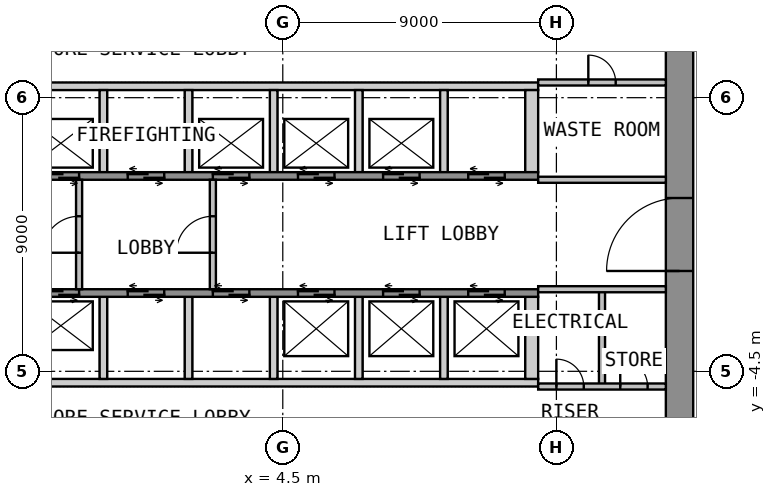
"""IFC4 building model, lengths in metres.
Left out: names, types, materials, properties, quantities, classifications, styles, units other than length and angle.
Written with IfcOpenShell. Run it as: python <this file> out.ifc"""

import sys

from ifc_helpers import new_model, si_unit, direction, frame, frame_2d, origin, place, context, subcontext, project, spatial, polyline, rectangle, outline, extrude, element, fill, save


model = new_model("IFC4")
c1 = context("Model", 3, precision=1e-05, world=origin(), true_north=direction((0.0, 1.0)))
c2 = subcontext(c1, "Body", "Model", "MODEL_VIEW")
j1 = project(units=[si_unit("LENGTHUNIT", "METRE"), si_unit("PLANEANGLEUNIT", "RADIAN")], contexts=[c1])
p1 = place(None, origin())
s1 = spatial("IfcSite", under=j1, at=p1, CompositionType="ELEMENT")
p2 = place(p1, origin())
s2 = spatial("IfcBuilding", under=s1, at=p2, CompositionType="ELEMENT")
p3 = place(p2, origin())
s3 = spatial("IfcBuildingStorey", under=s2, at=p3, CompositionType="ELEMENT", Elevation=0.0)
p4 = place(p3, frame((17.55, -12.6, 0.0), z_axis=(0.0, 0.0, 1.0), x_axis=(0.0, 1.0, 0.0)))
e1 = element("IfcWall", 1, at=p4, inside=s3, PredefinedType="SHEAR", context=c2, shape_type="SweptSolid", body=[
    extrude(rectangle(XDim=25.2, YDim=0.9, at=frame_2d((12.6, 0.0))), origin(), (0.0, 0.0, 1.0), 5.6),
])
p5 = place(p4, frame((11.4, 0.0, 0.0)))
e2 = element("IfcOpeningElement", 2, at=p5, cuts=e1, PredefinedType="OPENING", context=c2, shape_type="SweptSolid", body=[
    extrude(rectangle(XDim=2.4, YDim=2.1, at=frame_2d((1.2, 1.05))), frame((0.0, 0.46, 0.0), z_axis=(0.0, -1.0, 0.0), x_axis=(1.0, 0.0, 0.0)), (0.0, 0.0, 1.0), 0.92),
])
p6 = place(p3, origin())
e3 = element("IfcWall", 3, at=p6, inside=s3, PredefinedType="SHEAR", context=c2, shape_type="SweptSolid", body=[
    extrude(outline(polyline([(-12.9, 4.75), (12.9, 4.75), (12.9, 5.0), (-12.9, 5.0), (-12.9, 4.75)])), origin(), (0.0, 0.0, 1.0), 5.6),
])
p7 = place(p3, origin())
e4 = element("IfcWall", 4, at=p7, inside=s3, PredefinedType="SHEAR", context=c2, shape_type="SweptSolid", body=[
    extrude(outline(polyline([(-1.525, 2.05), (-1.275, 2.05), (-1.275, 4.75), (-1.525, 4.75), (-1.525, 2.05)])), origin(), (0.0, 0.0, 1.0), 5.6),
])
p8 = place(p3, origin())
e5 = element("IfcWall", 5, at=p8, inside=s3, PredefinedType="SHEAR", context=c2, shape_type="SweptSolid", body=[
    extrude(outline(polyline([(1.275, 2.05), (1.525, 2.05), (1.525, 4.75), (1.275, 4.75), (1.275, 2.05)])), origin(), (0.0, 0.0, 1.0), 5.6),
])
p9 = place(p3, origin())
e6 = element("IfcWall", 6, at=p9, inside=s3, PredefinedType="SHEAR", context=c2, shape_type="SweptSolid", body=[
    extrude(outline(polyline([(4.075, 2.05), (4.325, 2.05), (4.325, 4.75), (4.075, 4.75), (4.075, 2.05)])), origin(), (0.0, 0.0, 1.0), 5.6),
])
p10 = place(p3, origin())
e7 = element("IfcWall", 7, at=p10, inside=s3, PredefinedType="SHEAR", context=c2, shape_type="SweptSolid", body=[
    extrude(outline(polyline([(6.875, 2.05), (7.125, 2.05), (7.125, 4.75), (6.875, 4.75), (6.875, 2.05)])), origin(), (0.0, 0.0, 1.0), 5.6),
])
p11 = place(p3, origin())
e8 = element("IfcWall", 8, at=p11, inside=s3, PredefinedType="SHEAR", context=c2, shape_type="SweptSolid", body=[
    extrude(outline(polyline([(9.675, 2.05), (9.925, 2.05), (9.925, 4.75), (9.675, 4.75), (9.675, 2.05)])), origin(), (0.0, 0.0, 1.0), 5.6),
])
p12 = place(p3, origin())
e9 = element("IfcWall", 9, at=p12, inside=s3, PredefinedType="SHEAR", context=c2, shape_type="SweptSolid", body=[
    extrude(outline(polyline([(12.475, 2.05), (12.9, 2.05), (12.9, 4.75), (12.475, 4.75), (12.475, 2.05)])), origin(), (0.0, 0.0, 1.0), 5.6),
])
p13 = place(p3, frame((-12.9, 1.925, 0.0), z_axis=(0.0, 0.0, 1.0), x_axis=(1.0, 0.0, 0.0)))
e10 = element("IfcWall", 10, at=p13, inside=s3, PredefinedType="SHEAR", context=c2, shape_type="SweptSolid", body=[
    extrude(rectangle(XDim=25.8, YDim=0.25, at=frame_2d((12.9, 0.0))), origin(), (0.0, 0.0, 1.0), 5.6),
])
p14 = place(p13, frame((1.1, 0.0, 0.0)))
e11 = element("IfcOpeningElement", 11, at=p14, cuts=e10, PredefinedType="OPENING", context=c2, shape_type="SweptSolid", body=[
    extrude(rectangle(XDim=1.2, YDim=2.1, at=frame_2d((0.6, 1.05))), frame((0.0, 0.135, 0.0), z_axis=(0.0, -1.0, 0.0), x_axis=(1.0, 0.0, 0.0)), (0.0, 0.0, 1.0), 0.27),
])
p15 = place(p13, frame((3.9, 0.0, 0.0)))
e12 = element("IfcOpeningElement", 12, at=p15, cuts=e10, PredefinedType="OPENING", context=c2, shape_type="SweptSolid", body=[
    extrude(rectangle(XDim=1.2, YDim=2.1, at=frame_2d((0.6, 1.05))), frame((0.0, 0.135, 0.0), z_axis=(0.0, -1.0, 0.0), x_axis=(1.0, 0.0, 0.0)), (0.0, 0.0, 1.0), 0.27),
])
p16 = place(p13, frame((6.7, 0.0, 0.0)))
e13 = element("IfcOpeningElement", 13, at=p16, cuts=e10, PredefinedType="OPENING", context=c2, shape_type="SweptSolid", body=[
    extrude(rectangle(XDim=1.2, YDim=2.1, at=frame_2d((0.6, 1.05))), frame((0.0, 0.135, 0.0), z_axis=(0.0, -1.0, 0.0), x_axis=(1.0, 0.0, 0.0)), (0.0, 0.0, 1.0), 0.27),
])
p17 = place(p13, frame((9.5, 0.0, 0.0)))
e14 = element("IfcOpeningElement", 14, at=p17, cuts=e10, PredefinedType="OPENING", context=c2, shape_type="SweptSolid", body=[
    extrude(rectangle(XDim=1.2, YDim=2.1, at=frame_2d((0.6, 1.05))), frame((0.0, 0.135, 0.0), z_axis=(0.0, -1.0, 0.0), x_axis=(1.0, 0.0, 0.0)), (0.0, 0.0, 1.0), 0.27),
])
p18 = place(p13, frame((12.3, 0.0, 0.0)))
e15 = element("IfcOpeningElement", 15, at=p18, cuts=e10, PredefinedType="OPENING", context=c2, shape_type="SweptSolid", body=[
    extrude(rectangle(XDim=1.2, YDim=2.1, at=frame_2d((0.6, 1.05))), frame((0.0, 0.135, 0.0), z_axis=(0.0, -1.0, 0.0), x_axis=(1.0, 0.0, 0.0)), (0.0, 0.0, 1.0), 0.27),
])
p19 = place(p13, frame((15.1, 0.0, 0.0)))
e16 = element("IfcOpeningElement", 16, at=p19, cuts=e10, PredefinedType="OPENING", context=c2, shape_type="SweptSolid", body=[
    extrude(rectangle(XDim=1.2, YDim=2.1, at=frame_2d((0.6, 1.05))), frame((0.0, 0.135, 0.0), z_axis=(0.0, -1.0, 0.0), x_axis=(1.0, 0.0, 0.0)), (0.0, 0.0, 1.0), 0.27),
])
p20 = place(p13, frame((17.9, 0.0, 0.0)))
e17 = element("IfcOpeningElement", 17, at=p20, cuts=e10, PredefinedType="OPENING", context=c2, shape_type="SweptSolid", body=[
    extrude(rectangle(XDim=1.2, YDim=2.1, at=frame_2d((0.6, 1.05))), frame((0.0, 0.135, 0.0), z_axis=(0.0, -1.0, 0.0), x_axis=(1.0, 0.0, 0.0)), (0.0, 0.0, 1.0), 0.27),
])
p21 = place(p13, frame((20.7, 0.0, 0.0)))
e18 = element("IfcOpeningElement", 18, at=p21, cuts=e10, PredefinedType="OPENING", context=c2, shape_type="SweptSolid", body=[
    extrude(rectangle(XDim=1.2, YDim=2.1, at=frame_2d((0.6, 1.05))), frame((0.0, 0.135, 0.0), z_axis=(0.0, -1.0, 0.0), x_axis=(1.0, 0.0, 0.0)), (0.0, 0.0, 1.0), 0.27),
])
p22 = place(p13, frame((23.5, 0.0, 0.0)))
e19 = element("IfcOpeningElement", 19, at=p22, cuts=e10, PredefinedType="OPENING", context=c2, shape_type="SweptSolid", body=[
    extrude(rectangle(XDim=1.2, YDim=2.1, at=frame_2d((0.6, 1.05))), frame((0.0, 0.135, 0.0), z_axis=(0.0, -1.0, 0.0), x_axis=(1.0, 0.0, 0.0)), (0.0, 0.0, 1.0), 0.27),
])
p23 = place(p3, origin())
e20 = element("IfcWall", 20, at=p23, inside=s3, PredefinedType="SHEAR", context=c2, shape_type="SweptSolid", body=[
    extrude(outline(polyline([(-12.9, -5.0), (12.9, -5.0), (12.9, -4.75), (-12.9, -4.75), (-12.9, -5.0)])), origin(), (0.0, 0.0, 1.0), 5.6),
])
p24 = place(p3, origin())
e21 = element("IfcWall", 21, at=p24, inside=s3, PredefinedType="SHEAR", context=c2, shape_type="SweptSolid", body=[
    extrude(outline(polyline([(-1.525, -4.75), (-1.275, -4.75), (-1.275, -2.05), (-1.525, -2.05), (-1.525, -4.75)])), origin(), (0.0, 0.0, 1.0), 5.6),
])
p25 = place(p3, origin())
e22 = element("IfcWall", 22, at=p25, inside=s3, PredefinedType="SHEAR", context=c2, shape_type="SweptSolid", body=[
    extrude(outline(polyline([(1.275, -4.75), (1.525, -4.75), (1.525, -2.05), (1.275, -2.05), (1.275, -4.75)])), origin(), (0.0, 0.0, 1.0), 5.6),
])
p26 = place(p3, origin())
e23 = element("IfcWall", 23, at=p26, inside=s3, PredefinedType="SHEAR", context=c2, shape_type="SweptSolid", body=[
    extrude(outline(polyline([(4.075, -4.75), (4.325, -4.75), (4.325, -2.05), (4.075, -2.05), (4.075, -4.75)])), origin(), (0.0, 0.0, 1.0), 5.6),
])
p27 = place(p3, origin())
e24 = element("IfcWall", 24, at=p27, inside=s3, PredefinedType="SHEAR", context=c2, shape_type="SweptSolid", body=[
    extrude(outline(polyline([(6.875, -4.75), (7.125, -4.75), (7.125, -2.05), (6.875, -2.05), (6.875, -4.75)])), origin(), (0.0, 0.0, 1.0), 5.6),
])
p28 = place(p3, origin())
e25 = element("IfcWall", 25, at=p28, inside=s3, PredefinedType="SHEAR", context=c2, shape_type="SweptSolid", body=[
    extrude(outline(polyline([(9.675, -4.75), (9.925, -4.75), (9.925, -2.05), (9.675, -2.05), (9.675, -4.75)])), origin(), (0.0, 0.0, 1.0), 5.6),
])
p29 = place(p3, origin())
e26 = element("IfcWall", 26, at=p29, inside=s3, PredefinedType="SHEAR", context=c2, shape_type="SweptSolid", body=[
    extrude(outline(polyline([(12.475, -4.75), (12.9, -4.75), (12.9, -2.05), (12.475, -2.05), (12.475, -4.75)])), origin(), (0.0, 0.0, 1.0), 5.6),
])
p30 = place(p3, frame((-12.9, -1.925, 0.0), z_axis=(0.0, 0.0, 1.0), x_axis=(1.0, 0.0, 0.0)))
e27 = element("IfcWall", 27, at=p30, inside=s3, PredefinedType="SHEAR", context=c2, shape_type="SweptSolid", body=[
    extrude(rectangle(XDim=25.8, YDim=0.25, at=frame_2d((12.9, 0.0))), origin(), (0.0, 0.0, 1.0), 5.6),
])
p31 = place(p30, frame((1.1, 0.0, 0.0)))
e28 = element("IfcOpeningElement", 28, at=p31, cuts=e27, PredefinedType="OPENING", context=c2, shape_type="SweptSolid", body=[
    extrude(rectangle(XDim=1.2, YDim=2.1, at=frame_2d((0.6, 1.05))), frame((0.0, 0.135, 0.0), z_axis=(0.0, -1.0, 0.0), x_axis=(1.0, 0.0, 0.0)), (0.0, 0.0, 1.0), 0.27),
])
p32 = place(p30, frame((3.9, 0.0, 0.0)))
e29 = element("IfcOpeningElement", 29, at=p32, cuts=e27, PredefinedType="OPENING", context=c2, shape_type="SweptSolid", body=[
    extrude(rectangle(XDim=1.2, YDim=2.1, at=frame_2d((0.6, 1.05))), frame((0.0, 0.135, 0.0), z_axis=(0.0, -1.0, 0.0), x_axis=(1.0, 0.0, 0.0)), (0.0, 0.0, 1.0), 0.27),
])
p33 = place(p30, frame((6.7, 0.0, 0.0)))
e30 = element("IfcOpeningElement", 30, at=p33, cuts=e27, PredefinedType="OPENING", context=c2, shape_type="SweptSolid", body=[
    extrude(rectangle(XDim=1.2, YDim=2.1, at=frame_2d((0.6, 1.05))), frame((0.0, 0.135, 0.0), z_axis=(0.0, -1.0, 0.0), x_axis=(1.0, 0.0, 0.0)), (0.0, 0.0, 1.0), 0.27),
])
p34 = place(p30, frame((9.5, 0.0, 0.0)))
e31 = element("IfcOpeningElement", 31, at=p34, cuts=e27, PredefinedType="OPENING", context=c2, shape_type="SweptSolid", body=[
    extrude(rectangle(XDim=1.2, YDim=2.1, at=frame_2d((0.6, 1.05))), frame((0.0, 0.135, 0.0), z_axis=(0.0, -1.0, 0.0), x_axis=(1.0, 0.0, 0.0)), (0.0, 0.0, 1.0), 0.27),
])
p35 = place(p30, frame((12.3, 0.0, 0.0)))
e32 = element("IfcOpeningElement", 32, at=p35, cuts=e27, PredefinedType="OPENING", context=c2, shape_type="SweptSolid", body=[
    extrude(rectangle(XDim=1.2, YDim=2.1, at=frame_2d((0.6, 1.05))), frame((0.0, 0.135, 0.0), z_axis=(0.0, -1.0, 0.0), x_axis=(1.0, 0.0, 0.0)), (0.0, 0.0, 1.0), 0.27),
])
p36 = place(p30, frame((15.1, 0.0, 0.0)))
e33 = element("IfcOpeningElement", 33, at=p36, cuts=e27, PredefinedType="OPENING", context=c2, shape_type="SweptSolid", body=[
    extrude(rectangle(XDim=1.2, YDim=2.1, at=frame_2d((0.6, 1.05))), frame((0.0, 0.135, 0.0), z_axis=(0.0, -1.0, 0.0), x_axis=(1.0, 0.0, 0.0)), (0.0, 0.0, 1.0), 0.27),
])
p37 = place(p30, frame((17.9, 0.0, 0.0)))
e34 = element("IfcOpeningElement", 34, at=p37, cuts=e27, PredefinedType="OPENING", context=c2, shape_type="SweptSolid", body=[
    extrude(rectangle(XDim=1.2, YDim=2.1, at=frame_2d((0.6, 1.05))), frame((0.0, 0.135, 0.0), z_axis=(0.0, -1.0, 0.0), x_axis=(1.0, 0.0, 0.0)), (0.0, 0.0, 1.0), 0.27),
])
p38 = place(p30, frame((20.7, 0.0, 0.0)))
e35 = element("IfcOpeningElement", 35, at=p38, cuts=e27, PredefinedType="OPENING", context=c2, shape_type="SweptSolid", body=[
    extrude(rectangle(XDim=1.2, YDim=2.1, at=frame_2d((0.6, 1.05))), frame((0.0, 0.135, 0.0), z_axis=(0.0, -1.0, 0.0), x_axis=(1.0, 0.0, 0.0)), (0.0, 0.0, 1.0), 0.27),
])
p39 = place(p30, frame((23.5, 0.0, 0.0)))
e36 = element("IfcOpeningElement", 36, at=p39, cuts=e27, PredefinedType="OPENING", context=c2, shape_type="SweptSolid", body=[
    extrude(rectangle(XDim=1.2, YDim=2.1, at=frame_2d((0.6, 1.05))), frame((0.0, 0.135, 0.0), z_axis=(0.0, -1.0, 0.0), x_axis=(1.0, 0.0, 0.0)), (0.0, 0.0, 1.0), 0.27),
])
p40 = place(p3, frame((-2.2, -1.8, 0.0), z_axis=(0.0, 0.0, 1.0), x_axis=(0.0, 1.0, 0.0)))
e37 = element("IfcWall", 37, at=p40, inside=s3, PredefinedType="PARTITIONING", context=c2, shape_type="SweptSolid", body=[
    extrude(rectangle(XDim=3.6, YDim=0.2, at=frame_2d((1.8, 0.0))), origin(), (0.0, 0.0, 1.0), 5.6),
])
p41 = place(p40, frame((1.2, 0.0, 0.0)))
e38 = element("IfcOpeningElement", 38, at=p41, cuts=e37, PredefinedType="OPENING", context=c2, shape_type="SweptSolid", body=[
    extrude(rectangle(XDim=1.2, YDim=2.1, at=frame_2d((0.6, 1.05))), frame((0.0, 0.11, 0.0), z_axis=(0.0, -1.0, 0.0), x_axis=(1.0, 0.0, 0.0)), (0.0, 0.0, 1.0), 0.22),
])
p42 = place(p3, frame((2.2, -1.8, 0.0), z_axis=(0.0, 0.0, 1.0), x_axis=(0.0, 1.0, 0.0)))
e39 = element("IfcWall", 39, at=p42, inside=s3, PredefinedType="PARTITIONING", context=c2, shape_type="SweptSolid", body=[
    extrude(rectangle(XDim=3.6, YDim=0.2, at=frame_2d((1.8, 0.0))), origin(), (0.0, 0.0, 1.0), 5.6),
])
p43 = place(p42, frame((1.2, 0.0, 0.0)))
e40 = element("IfcOpeningElement", 40, at=p43, cuts=e39, PredefinedType="OPENING", context=c2, shape_type="SweptSolid", body=[
    extrude(rectangle(XDim=1.2, YDim=2.1, at=frame_2d((0.6, 1.05))), frame((0.0, 0.11, 0.0), z_axis=(0.0, -1.0, 0.0), x_axis=(1.0, 0.0, 0.0)), (0.0, 0.0, 1.0), 0.22),
])
p44 = place(p3, frame((12.9, 5.0, 0.0), z_axis=(0.0, 0.0, 1.0), x_axis=(1.0, 0.0, 0.0)))
e41 = element("IfcWall", 41, at=p44, inside=s3, PredefinedType="PARTITIONING", context=c2, shape_type="SweptSolid", body=[
    extrude(rectangle(XDim=4.2, YDim=0.2, at=frame_2d((2.1, 0.0))), origin(), (0.0, 0.0, 1.0), 5.6),
])
p45 = place(p44, frame((1.65, 0.0, 0.0)))
e42 = element("IfcOpeningElement", 42, at=p45, cuts=e41, PredefinedType="OPENING", context=c2, shape_type="SweptSolid", body=[
    extrude(rectangle(XDim=0.9, YDim=2.1, at=frame_2d((0.45, 1.05))), frame((0.0, 0.11, 0.0), z_axis=(0.0, -1.0, 0.0), x_axis=(1.0, 0.0, 0.0)), (0.0, 0.0, 1.0), 0.22),
])
p46 = place(p3, frame((12.9, 1.8, 0.0), z_axis=(0.0, 0.0, 1.0), x_axis=(1.0, 0.0, 0.0)))
e43 = element("IfcWall", 43, at=p46, inside=s3, PredefinedType="PARTITIONING", context=c2, shape_type="SweptSolid", body=[
    extrude(rectangle(XDim=4.2, YDim=0.2, at=frame_2d((2.1, 0.0))), origin(), (0.0, 0.0, 1.0), 5.6),
])
p47 = place(p3, frame((15.0, -5.0, 0.0), z_axis=(0.0, 0.0, 1.0), x_axis=(0.0, 1.0, 0.0)))
e44 = element("IfcWall", 44, at=p47, inside=s3, PredefinedType="PARTITIONING", context=c2, shape_type="SweptSolid", body=[
    extrude(rectangle(XDim=3.2, YDim=0.2, at=frame_2d((1.6, 0.0))), origin(), (0.0, 0.0, 1.0), 5.6),
])
p48 = place(p3, frame((12.9, -5.0, 0.0), z_axis=(0.0, 0.0, 1.0), x_axis=(1.0, 0.0, 0.0)))
e45 = element("IfcWall", 45, at=p48, inside=s3, PredefinedType="PARTITIONING", context=c2, shape_type="SweptSolid", body=[
    extrude(rectangle(XDim=4.2, YDim=0.2, at=frame_2d((2.1, 0.0))), origin(), (0.0, 0.0, 1.0), 5.6),
])
p49 = place(p48, frame((0.6, 0.0, 0.0)))
e46 = element("IfcOpeningElement", 46, at=p49, cuts=e45, PredefinedType="OPENING", context=c2, shape_type="SweptSolid", body=[
    extrude(rectangle(XDim=0.9, YDim=2.1, at=frame_2d((0.45, 1.05))), frame((0.0, 0.11, 0.0), z_axis=(0.0, -1.0, 0.0), x_axis=(1.0, 0.0, 0.0)), (0.0, 0.0, 1.0), 0.22),
])
p50 = place(p48, frame((2.7, 0.0, 0.0)))
e47 = element("IfcOpeningElement", 47, at=p50, cuts=e45, PredefinedType="OPENING", context=c2, shape_type="SweptSolid", body=[
    extrude(rectangle(XDim=0.9, YDim=2.1, at=frame_2d((0.45, 1.05))), frame((0.0, 0.11, 0.0), z_axis=(0.0, -1.0, 0.0), x_axis=(1.0, 0.0, 0.0)), (0.0, 0.0, 1.0), 0.22),
])
p51 = place(p3, frame((12.9, -1.8, 0.0), z_axis=(0.0, 0.0, 1.0), x_axis=(1.0, 0.0, 0.0)))
e48 = element("IfcWall", 48, at=p51, inside=s3, PredefinedType="PARTITIONING", context=c2, shape_type="SweptSolid", body=[
    extrude(rectangle(XDim=4.2, YDim=0.2, at=frame_2d((2.1, 0.0))), origin(), (0.0, 0.0, 1.0), 5.6),
])
p52 = place(p5, origin())
e49 = element("IfcDoor", 49, at=p52, inside=s3, OperationType="DOUBLE_DOOR_DOUBLE_SWING", PredefinedType="DOOR", context=c2, shape_type="SweptSolid", body=[
    extrude(rectangle(XDim=2.4, YDim=2.1, at=frame_2d((1.2, 1.05))), frame((0.0, 0.025, 0.0), z_axis=(0.0, -1.0, 0.0), x_axis=(1.0, 0.0, 0.0)), (0.0, 0.0, 1.0), 0.05),
])
fill(e2, e49)
p53 = place(p17, origin())
e50 = element("IfcDoor", 50, at=p53, inside=s3, OperationType="DOUBLE_DOOR_SLIDING", PredefinedType="DOOR", context=c2, shape_type="SweptSolid", body=[
    extrude(rectangle(XDim=1.2, YDim=2.1, at=frame_2d((0.6, 1.05))), frame((0.0, 0.025, 0.0), z_axis=(0.0, -1.0, 0.0), x_axis=(1.0, 0.0, 0.0)), (0.0, 0.0, 1.0), 0.05),
])
fill(e14, e50)
p54 = place(p18, origin())
e51 = element("IfcDoor", 51, at=p54, inside=s3, OperationType="DOUBLE_DOOR_SLIDING", PredefinedType="DOOR", context=c2, shape_type="SweptSolid", body=[
    extrude(rectangle(XDim=1.2, YDim=2.1, at=frame_2d((0.6, 1.05))), frame((0.0, 0.025, 0.0), z_axis=(0.0, -1.0, 0.0), x_axis=(1.0, 0.0, 0.0)), (0.0, 0.0, 1.0), 0.05),
])
fill(e15, e51)
p55 = place(p19, origin())
e52 = element("IfcDoor", 52, at=p55, inside=s3, OperationType="DOUBLE_DOOR_SLIDING", PredefinedType="DOOR", context=c2, shape_type="SweptSolid", body=[
    extrude(rectangle(XDim=1.2, YDim=2.1, at=frame_2d((0.6, 1.05))), frame((0.0, 0.025, 0.0), z_axis=(0.0, -1.0, 0.0), x_axis=(1.0, 0.0, 0.0)), (0.0, 0.0, 1.0), 0.05),
])
fill(e16, e52)
p56 = place(p20, origin())
e53 = element("IfcDoor", 53, at=p56, inside=s3, OperationType="DOUBLE_DOOR_SLIDING", PredefinedType="DOOR", context=c2, shape_type="SweptSolid", body=[
    extrude(rectangle(XDim=1.2, YDim=2.1, at=frame_2d((0.6, 1.05))), frame((0.0, 0.025, 0.0), z_axis=(0.0, -1.0, 0.0), x_axis=(1.0, 0.0, 0.0)), (0.0, 0.0, 1.0), 0.05),
])
fill(e17, e53)
p57 = place(p21, origin())
e54 = element("IfcDoor", 54, at=p57, inside=s3, OperationType="DOUBLE_DOOR_SLIDING", PredefinedType="DOOR", context=c2, shape_type="SweptSolid", body=[
    extrude(rectangle(XDim=1.2, YDim=2.1, at=frame_2d((0.6, 1.05))), frame((0.0, 0.025, 0.0), z_axis=(0.0, -1.0, 0.0), x_axis=(1.0, 0.0, 0.0)), (0.0, 0.0, 1.0), 0.05),
])
fill(e18, e54)
p58 = place(p22, origin())
e55 = element("IfcDoor", 55, at=p58, inside=s3, OperationType="DOUBLE_DOOR_SLIDING", PredefinedType="DOOR", context=c2, shape_type="SweptSolid", body=[
    extrude(rectangle(XDim=1.2, YDim=2.1, at=frame_2d((0.6, 1.05))), frame((0.0, 0.025, 0.0), z_axis=(0.0, -1.0, 0.0), x_axis=(1.0, 0.0, 0.0)), (0.0, 0.0, 1.0), 0.05),
])
fill(e19, e55)
p59 = place(p34, origin())
e56 = element("IfcDoor", 56, at=p59, inside=s3, OperationType="DOUBLE_DOOR_SLIDING", PredefinedType="DOOR", context=c2, shape_type="SweptSolid", body=[
    extrude(rectangle(XDim=1.2, YDim=2.1, at=frame_2d((0.6, 1.05))), frame((0.0, 0.025, 0.0), z_axis=(0.0, -1.0, 0.0), x_axis=(1.0, 0.0, 0.0)), (0.0, 0.0, 1.0), 0.05),
])
fill(e31, e56)
p60 = place(p35, origin())
e57 = element("IfcDoor", 57, at=p60, inside=s3, OperationType="DOUBLE_DOOR_SLIDING", PredefinedType="DOOR", context=c2, shape_type="SweptSolid", body=[
    extrude(rectangle(XDim=1.2, YDim=2.1, at=frame_2d((0.6, 1.05))), frame((0.0, 0.025, 0.0), z_axis=(0.0, -1.0, 0.0), x_axis=(1.0, 0.0, 0.0)), (0.0, 0.0, 1.0), 0.05),
])
fill(e32, e57)
p61 = place(p36, origin())
e58 = element("IfcDoor", 58, at=p61, inside=s3, OperationType="DOUBLE_DOOR_SLIDING", PredefinedType="DOOR", context=c2, shape_type="SweptSolid", body=[
    extrude(rectangle(XDim=1.2, YDim=2.1, at=frame_2d((0.6, 1.05))), frame((0.0, 0.025, 0.0), z_axis=(0.0, -1.0, 0.0), x_axis=(1.0, 0.0, 0.0)), (0.0, 0.0, 1.0), 0.05),
])
fill(e33, e58)
p62 = place(p37, origin())
e59 = element("IfcDoor", 59, at=p62, inside=s3, OperationType="DOUBLE_DOOR_SLIDING", PredefinedType="DOOR", context=c2, shape_type="SweptSolid", body=[
    extrude(rectangle(XDim=1.2, YDim=2.1, at=frame_2d((0.6, 1.05))), frame((0.0, 0.025, 0.0), z_axis=(0.0, -1.0, 0.0), x_axis=(1.0, 0.0, 0.0)), (0.0, 0.0, 1.0), 0.05),
])
fill(e34, e59)
p63 = place(p38, origin())
e60 = element("IfcDoor", 60, at=p63, inside=s3, OperationType="DOUBLE_DOOR_SLIDING", PredefinedType="DOOR", context=c2, shape_type="SweptSolid", body=[
    extrude(rectangle(XDim=1.2, YDim=2.1, at=frame_2d((0.6, 1.05))), frame((0.0, 0.025, 0.0), z_axis=(0.0, -1.0, 0.0), x_axis=(1.0, 0.0, 0.0)), (0.0, 0.0, 1.0), 0.05),
])
fill(e35, e60)
p64 = place(p39, origin())
e61 = element("IfcDoor", 61, at=p64, inside=s3, OperationType="DOUBLE_DOOR_SLIDING", PredefinedType="DOOR", context=c2, shape_type="SweptSolid", body=[
    extrude(rectangle(XDim=1.2, YDim=2.1, at=frame_2d((0.6, 1.05))), frame((0.0, 0.025, 0.0), z_axis=(0.0, -1.0, 0.0), x_axis=(1.0, 0.0, 0.0)), (0.0, 0.0, 1.0), 0.05),
])
fill(e36, e61)
p65 = place(p41, origin())
e62 = element("IfcDoor", 62, at=p65, inside=s3, OperationType="SINGLE_SWING_LEFT", PredefinedType="DOOR", context=c2, shape_type="SweptSolid", body=[
    extrude(rectangle(XDim=1.2, YDim=2.1, at=frame_2d((0.6, 1.05))), frame((0.0, 0.025, 0.0), z_axis=(0.0, -1.0, 0.0), x_axis=(1.0, 0.0, 0.0)), (0.0, 0.0, 1.0), 0.05),
])
fill(e38, e62)
p66 = place(p43, origin())
e63 = element("IfcDoor", 63, at=p66, inside=s3, OperationType="SINGLE_SWING_LEFT", PredefinedType="DOOR", context=c2, shape_type="SweptSolid", body=[
    extrude(rectangle(XDim=1.2, YDim=2.1, at=frame_2d((0.6, 1.05))), frame((0.0, 0.025, 0.0), z_axis=(0.0, -1.0, 0.0), x_axis=(1.0, 0.0, 0.0)), (0.0, 0.0, 1.0), 0.05),
])
fill(e40, e63)
p67 = place(p45, origin())
e64 = element("IfcDoor", 64, at=p67, inside=s3, OperationType="SINGLE_SWING_LEFT", PredefinedType="DOOR", context=c2, shape_type="SweptSolid", body=[
    extrude(rectangle(XDim=0.9, YDim=2.1, at=frame_2d((0.45, 1.05))), frame((0.0, 0.025, 0.0), z_axis=(0.0, -1.0, 0.0), x_axis=(1.0, 0.0, 0.0)), (0.0, 0.0, 1.0), 0.05),
])
fill(e42, e64)
p68 = place(p49, origin())
e65 = element("IfcDoor", 65, at=p68, inside=s3, OperationType="SINGLE_SWING_LEFT", PredefinedType="DOOR", context=c2, shape_type="SweptSolid", body=[
    extrude(rectangle(XDim=0.9, YDim=2.1, at=frame_2d((0.45, 1.05))), frame((0.0, 0.025, 0.0), z_axis=(0.0, -1.0, 0.0), x_axis=(1.0, 0.0, 0.0)), (0.0, 0.0, 1.0), 0.05),
])
fill(e46, e65)
p69 = place(p50, origin())
e66 = element("IfcDoor", 66, at=p69, inside=s3, OperationType="SINGLE_SWING_LEFT", PredefinedType="DOOR", context=c2, shape_type="SweptSolid", body=[
    extrude(rectangle(XDim=0.9, YDim=2.1, at=frame_2d((0.45, 1.05))), frame((0.0, 0.025, 0.0), z_axis=(0.0, -1.0, 0.0), x_axis=(1.0, 0.0, 0.0)), (0.0, 0.0, 1.0), 0.05),
])
fill(e47, e66)
save(model, sys.argv[1])
